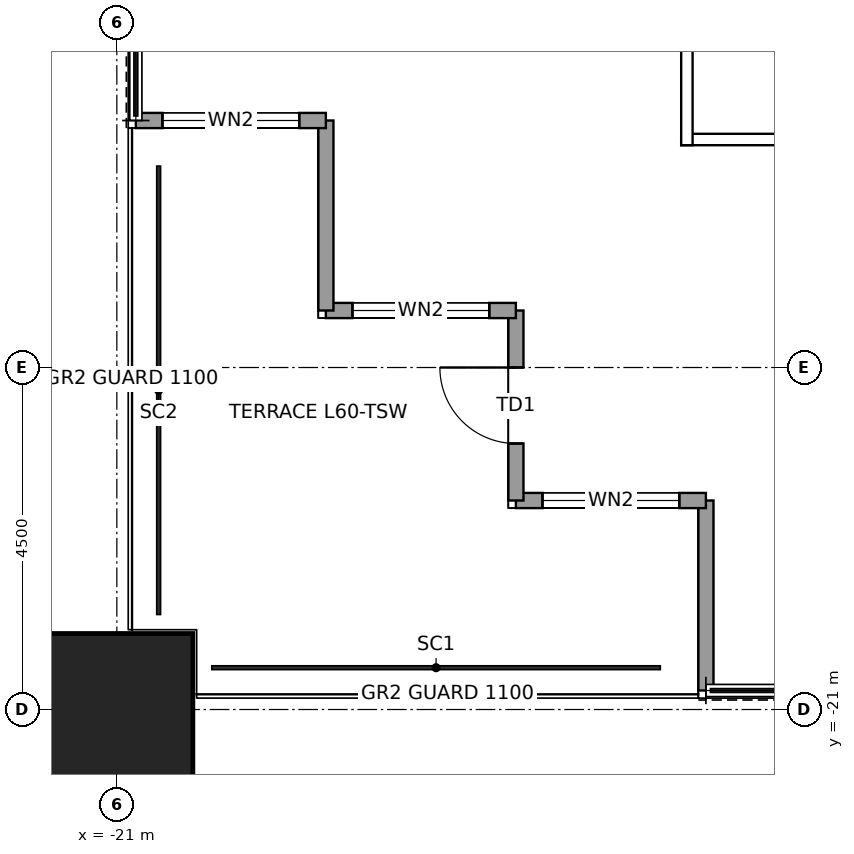
"""IFC4 building model, lengths in metres.
Left out: names, types, materials, properties, quantities, classifications, styles, units other than length and angle.
Written with IfcOpenShell. Run it as: python <this file> out.ifc"""

import sys

from ifc_helpers import new_model, si_unit, direction, frame, frame_2d, origin, origin_2d, place, context, subcontext, project, spatial, rectangle, hollow_rectangle, extrude, element, fill, save


model = new_model("IFC4")
c1 = context("Model", 3, precision=1e-05, world=origin(), true_north=direction((0.0, 1.0)))
c2 = subcontext(c1, "Body", "Model", "MODEL_VIEW")
j1 = project(units=[si_unit("LENGTHUNIT", "METRE"), si_unit("PLANEANGLEUNIT", "RADIAN")], contexts=[c1])
p1 = place(None, origin())
s1 = spatial("IfcSite", under=j1, at=p1, CompositionType="ELEMENT")
p2 = place(p1, origin())
s2 = spatial("IfcBuilding", under=s1, at=p2, CompositionType="ELEMENT")
p3 = place(p2, frame((0.0, 0.0, 275.9)))
s3 = spatial("IfcBuildingStorey", under=s2, at=p3, CompositionType="ELEMENT", Elevation=275.9)
p4 = place(p3, frame((-21.0, -21.0, 0.0), z_axis=(0.0, 0.0, 1.0), x_axis=(1.0, 0.0, 0.0)))
e1 = element("IfcColumn", 1, at=p4, inside=s3, PredefinedType="COLUMN", context=c2, shape_type="SweptSolid", body=[
    extrude(hollow_rectangle(XDim=2.0, YDim=2.0, WallThickness=0.095, at=origin_2d()), origin(), (0.0, 0.0, 1.0), 4.0),
])
p5 = place(p3, frame((-13.25, -20.75, 0.0), z_axis=(0.0, 0.0, 1.0), x_axis=(0.0, 1.0, 0.0)))
e2 = element("IfcWall", 2, at=p5, inside=s3, PredefinedType="SOLIDWALL", context=c2, shape_type="SweptSolid", body=[
    extrude(rectangle(XDim=2.5, YDim=0.2, at=frame_2d((1.25, 0.0))), origin(), (0.0, 0.0, 1.0), 3.85),
])
p6 = place(p3, frame((-13.25, -18.25, 0.0), z_axis=(0.0, 0.0, 1.0), x_axis=(-1.0, 0.0, 0.0)))
e3 = element("IfcWall", 3, at=p6, inside=s3, PredefinedType="SOLIDWALL", context=c2, shape_type="SweptSolid", body=[
    extrude(rectangle(XDim=2.5, YDim=0.2, at=frame_2d((1.25, 0.0))), origin(), (0.0, 0.0, 1.0), 3.85),
])
p7 = place(p6, frame((0.35, 0.0, 0.3)))
e4 = element("IfcOpeningElement", 4, at=p7, cuts=e3, PredefinedType="OPENING", context=c2, shape_type="SweptSolid", body=[
    extrude(rectangle(XDim=1.8, YDim=2.4, at=frame_2d((0.9, 1.2))), frame((0.0, 0.11, 0.0), z_axis=(0.0, -1.0, 0.0), x_axis=(1.0, 0.0, 0.0)), (0.0, 0.0, 1.0), 0.22),
])
p8 = place(p3, frame((-15.75, -18.25, 0.0), z_axis=(0.0, 0.0, 1.0), x_axis=(0.0, 1.0, 0.0)))
e5 = element("IfcWall", 5, at=p8, inside=s3, PredefinedType="SOLIDWALL", context=c2, shape_type="SweptSolid", body=[
    extrude(rectangle(XDim=2.5, YDim=0.2, at=frame_2d((1.25, 0.0))), origin(), (0.0, 0.0, 1.0), 3.317),
])
p9 = place(p8, frame((0.75, 0.0, 0.0)))
e6 = element("IfcOpeningElement", 6, at=p9, cuts=e5, PredefinedType="OPENING", context=c2, shape_type="SweptSolid", body=[
    extrude(rectangle(XDim=1.0, YDim=2.4, at=frame_2d((0.5, 1.2))), frame((0.0, 0.11, 0.0), z_axis=(0.0, -1.0, 0.0), x_axis=(1.0, 0.0, 0.0)), (0.0, 0.0, 1.0), 0.22),
])
p10 = place(p3, frame((-15.75, -15.75, 0.0), z_axis=(0.0, 0.0, 1.0), x_axis=(-1.0, 0.0, 0.0)))
e7 = element("IfcWall", 7, at=p10, inside=s3, PredefinedType="SOLIDWALL", context=c2, shape_type="SweptSolid", body=[
    extrude(rectangle(XDim=2.5, YDim=0.2, at=frame_2d((1.25, 0.0))), origin(), (0.0, 0.0, 1.0), 3.85),
])
p11 = place(p10, frame((0.35, 0.0, 0.3)))
e8 = element("IfcOpeningElement", 8, at=p11, cuts=e7, PredefinedType="OPENING", context=c2, shape_type="SweptSolid", body=[
    extrude(rectangle(XDim=1.8, YDim=2.4, at=frame_2d((0.9, 1.2))), frame((0.0, 0.11, 0.0), z_axis=(0.0, -1.0, 0.0), x_axis=(1.0, 0.0, 0.0)), (0.0, 0.0, 1.0), 0.22),
])
p12 = place(p3, frame((-18.25, -15.75, 0.0), z_axis=(0.0, 0.0, 1.0), x_axis=(0.0, 1.0, 0.0)))
e9 = element("IfcWall", 9, at=p12, inside=s3, PredefinedType="SOLIDWALL", context=c2, shape_type="SweptSolid", body=[
    extrude(rectangle(XDim=2.5, YDim=0.2, at=frame_2d((1.25, 0.0))), origin(), (0.0, 0.0, 1.0), 3.85),
])
p13 = place(p3, frame((-18.25, -13.25, 0.0), z_axis=(0.0, 0.0, 1.0), x_axis=(-1.0, 0.0, 0.0)))
e10 = element("IfcWall", 10, at=p13, inside=s3, PredefinedType="SOLIDWALL", context=c2, shape_type="SweptSolid", body=[
    extrude(rectangle(XDim=2.5, YDim=0.2, at=frame_2d((1.25, 0.0))), origin(), (0.0, 0.0, 1.0), 3.85),
])
p14 = place(p13, frame((0.35, 0.0, 0.3)))
e11 = element("IfcOpeningElement", 11, at=p14, cuts=e10, PredefinedType="OPENING", context=c2, shape_type="SweptSolid", body=[
    extrude(rectangle(XDim=1.8, YDim=2.4, at=frame_2d((0.9, 1.2))), frame((0.0, 0.11, 0.0), z_axis=(0.0, -1.0, 0.0), x_axis=(1.0, 0.0, 0.0)), (0.0, 0.0, 1.0), 0.22),
])
p15 = place(p3, frame((-13.575, -13.5, 0.0), z_axis=(0.0, 0.0, 1.0), x_axis=(1.0, 0.0, 0.0)))
e12 = element("IfcWall", 12, at=p15, inside=s3, PredefinedType="PARTITIONING", context=c2, shape_type="SweptSolid", body=[
    extrude(rectangle(XDim=11.15, YDim=0.15, at=frame_2d((5.575, 0.0))), origin(), (0.0, 0.0, 1.0), 3.85),
])
p16 = place(p15, frame((5.075, 0.0, 0.0)))
e13 = element("IfcOpeningElement", 13, at=p16, cuts=e12, PredefinedType="OPENING", context=c2, shape_type="SweptSolid", body=[
    extrude(rectangle(XDim=1.0, YDim=2.4, at=frame_2d((0.5, 1.2))), frame((0.0, 0.085, 0.0), z_axis=(0.0, -1.0, 0.0), x_axis=(1.0, 0.0, 0.0)), (0.0, 0.0, 1.0), 0.17),
])
p17 = place(p3, frame((-13.5, -13.575, 0.0), z_axis=(0.0, 0.0, 1.0), x_axis=(0.0, 1.0, 0.0)))
e14 = element("IfcWall", 14, at=p17, inside=s3, PredefinedType="PARTITIONING", context=c2, shape_type="SweptSolid", body=[
    extrude(rectangle(XDim=13.65, YDim=0.15, at=frame_2d((6.825, 0.0))), origin(), (0.0, 0.0, 1.0), 3.85),
])
p18 = place(p7, origin())
e15 = element("IfcWindow", 15, at=p18, inside=s3, PartitioningType="SINGLE_PANEL", PredefinedType="WINDOW", context=c2, shape_type="SweptSolid", body=[
    extrude(rectangle(XDim=1.8, YDim=2.4, at=frame_2d((0.9, 1.2))), frame((0.0, 0.03, 0.0), z_axis=(0.0, -1.0, 0.0), x_axis=(1.0, 0.0, 0.0)), (0.0, 0.0, 1.0), 0.06),
])
fill(e4, e15)
p19 = place(p9, origin())
e16 = element("IfcDoor", 16, at=p19, inside=s3, OperationType="SINGLE_SWING_RIGHT", PredefinedType="DOOR", context=c2, shape_type="SweptSolid", body=[
    extrude(rectangle(XDim=1.0, YDim=2.4, at=frame_2d((0.5, 1.2))), frame((0.0, 0.025, 0.0), z_axis=(0.0, -1.0, 0.0), x_axis=(1.0, 0.0, 0.0)), (0.0, 0.0, 1.0), 0.05),
])
fill(e6, e16)
p20 = place(p11, origin())
e17 = element("IfcWindow", 17, at=p20, inside=s3, PartitioningType="SINGLE_PANEL", PredefinedType="WINDOW", context=c2, shape_type="SweptSolid", body=[
    extrude(rectangle(XDim=1.8, YDim=2.4, at=frame_2d((0.9, 1.2))), frame((0.0, 0.03, 0.0), z_axis=(0.0, -1.0, 0.0), x_axis=(1.0, 0.0, 0.0)), (0.0, 0.0, 1.0), 0.06),
])
fill(e8, e17)
p21 = place(p14, origin())
e18 = element("IfcWindow", 18, at=p21, inside=s3, PartitioningType="SINGLE_PANEL", PredefinedType="WINDOW", context=c2, shape_type="SweptSolid", body=[
    extrude(rectangle(XDim=1.8, YDim=2.4, at=frame_2d((0.9, 1.2))), frame((0.0, 0.03, 0.0), z_axis=(0.0, -1.0, 0.0), x_axis=(1.0, 0.0, 0.0)), (0.0, 0.0, 1.0), 0.06),
])
fill(e11, e18)
save(model, sys.argv[1])
